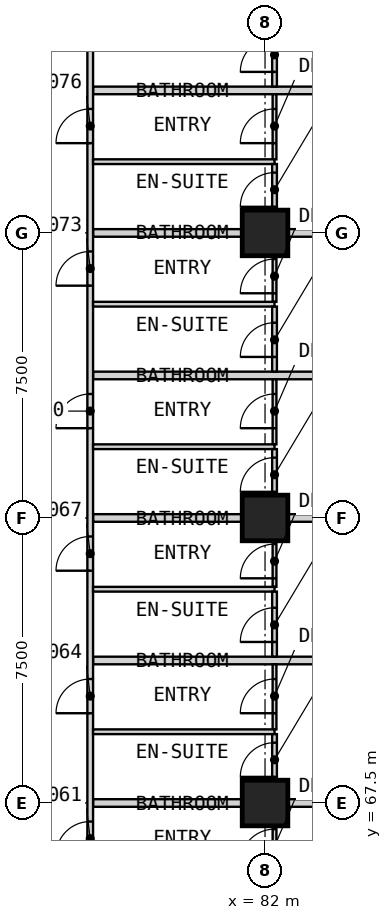
"""IFC4 building model, lengths in metres.
Left out: names, types, materials, properties, quantities, classifications, styles, units other than length and angle.
Written with IfcOpenShell. Run it as: python <this file> out.ifc"""

import sys

from ifc_helpers import new_model, si_unit, direction, frame, frame_2d, origin, origin_2d, place, context, subcontext, project, spatial, rectangle, extrude, element, fill, save


model = new_model("IFC4")
c1 = context("Model", 3, precision=1e-05, world=origin(), true_north=direction((0.0, 1.0)))
c2 = subcontext(c1, "Body", "Model", "MODEL_VIEW")
j1 = project(units=[si_unit("LENGTHUNIT", "METRE"), si_unit("PLANEANGLEUNIT", "RADIAN")], contexts=[c1])
p1 = place(None, origin())
s1 = spatial("IfcSite", under=j1, at=p1, CompositionType="ELEMENT")
p2 = place(p1, origin())
s2 = spatial("IfcBuilding", under=s1, at=p2, CompositionType="ELEMENT")
p3 = place(p2, frame((0.0, 0.0, 48.4)))
s3 = spatial("IfcBuildingStorey", under=s2, at=p3, CompositionType="ELEMENT", Elevation=48.4)
for number, where, z_axis, x_axis in (
    (1, (82.0, 67.5, 0.0), (0.0, 0.0, 1.0), (1.0, 0.0, 0.0)),
    (2, (82.0, 75.0, 0.0), (0.0, 0.0, 1.0), (1.0, 0.0, 0.0)),
    (3, (82.0, 82.5, 0.0), (0.0, 0.0, 1.0), (1.0, 0.0, 0.0)),
):
    element("IfcColumn", number, at=place(p3, frame(where, z_axis=z_axis, x_axis=x_axis)), inside=s3, PredefinedType="COLUMN", context=c2, shape_type="SweptSolid", body=[
        extrude(rectangle(XDim=1.2, YDim=1.2, at=origin_2d()), origin(), (0.0, 0.0, 1.0), 3.6),
    ])
p4 = place(p3, frame((77.475, 67.5, 0.0), z_axis=(0.0, 0.0, 1.0), x_axis=(1.0, 0.0, 0.0)))
e4 = element("IfcWall", 4, at=p4, inside=s3, PredefinedType="PARTITIONING", context=c2, shape_type="SweptSolid", body=[
    extrude(rectangle(XDim=12.525, YDim=0.2, at=frame_2d((6.262, 0.0))), origin(), (0.0, 0.0, 1.0), 3.35),
])
p5 = place(p3, frame((77.475, 71.25, 0.0), z_axis=(0.0, 0.0, 1.0), x_axis=(1.0, 0.0, 0.0)))
e5 = element("IfcWall", 5, at=p5, inside=s3, PredefinedType="PARTITIONING", context=c2, shape_type="SweptSolid", body=[
    extrude(rectangle(XDim=11.715, YDim=0.2, at=frame_2d((5.857, 0.0))), origin(), (0.0, 0.0, 1.0), 3.35),
])
p6 = place(p3, frame((77.475, 75.0, 0.0), z_axis=(0.0, 0.0, 1.0), x_axis=(1.0, 0.0, 0.0)))
e6 = element("IfcWall", 6, at=p6, inside=s3, PredefinedType="PARTITIONING", context=c2, shape_type="SweptSolid", body=[
    extrude(rectangle(XDim=12.525, YDim=0.2, at=frame_2d((6.262, 0.0))), origin(), (0.0, 0.0, 1.0), 3.35),
])
p7 = place(p3, frame((77.475, 78.75, 0.0), z_axis=(0.0, 0.0, 1.0), x_axis=(1.0, 0.0, 0.0)))
e7 = element("IfcWall", 7, at=p7, inside=s3, PredefinedType="PARTITIONING", context=c2, shape_type="SweptSolid", body=[
    extrude(rectangle(XDim=11.715, YDim=0.2, at=frame_2d((5.857, 0.0))), origin(), (0.0, 0.0, 1.0), 3.35),
])
p8 = place(p3, frame((77.475, 82.5, 0.0), z_axis=(0.0, 0.0, 1.0), x_axis=(1.0, 0.0, 0.0)))
e8 = element("IfcWall", 8, at=p8, inside=s3, PredefinedType="PARTITIONING", context=c2, shape_type="SweptSolid", body=[
    extrude(rectangle(XDim=12.525, YDim=0.2, at=frame_2d((6.262, 0.0))), origin(), (0.0, 0.0, 1.0), 3.35),
])
p9 = place(p3, frame((77.475, 86.25, 0.0), z_axis=(0.0, 0.0, 1.0), x_axis=(1.0, 0.0, 0.0)))
e9 = element("IfcWall", 9, at=p9, inside=s3, PredefinedType="PARTITIONING", context=c2, shape_type="SweptSolid", body=[
    extrude(rectangle(XDim=11.715, YDim=0.2, at=frame_2d((5.857, 0.0))), origin(), (0.0, 0.0, 1.0), 3.35),
])
p10 = place(p3, frame((77.4, 50.175, 0.0), z_axis=(0.0, 0.0, 1.0), x_axis=(0.0, 1.0, 0.0)))
e10 = element("IfcWall", 10, at=p10, inside=s3, PredefinedType="PARTITIONING", context=c2, shape_type="SweptSolid", body=[
    extrude(rectangle(XDim=42.15, YDim=0.15, at=frame_2d((21.075, 0.0))), origin(), (0.0, 0.0, 1.0), 3.35),
])
p11 = place(p10, frame((4.688, 0.0, 0.0)))
e11 = element("IfcOpeningElement", 11, at=p11, cuts=e10, PredefinedType="OPENING", context=c2, shape_type="SweptSolid", body=[
    extrude(rectangle(XDim=0.9, YDim=2.1, at=frame_2d((0.45, 1.05))), frame((0.0, 0.085, 0.0), z_axis=(0.0, -1.0, 0.0), x_axis=(1.0, 0.0, 0.0)), (0.0, 0.0, 1.0), 0.17),
])
p12 = place(p10, frame((8.438, 0.0, 0.0)))
e12 = element("IfcOpeningElement", 12, at=p12, cuts=e10, PredefinedType="OPENING", context=c2, shape_type="SweptSolid", body=[
    extrude(rectangle(XDim=0.9, YDim=2.1, at=frame_2d((0.45, 1.05))), frame((0.0, 0.085, 0.0), z_axis=(0.0, -1.0, 0.0), x_axis=(1.0, 0.0, 0.0)), (0.0, 0.0, 1.0), 0.17),
])
p13 = place(p10, frame((12.188, 0.0, 0.0)))
e13 = element("IfcOpeningElement", 13, at=p13, cuts=e10, PredefinedType="OPENING", context=c2, shape_type="SweptSolid", body=[
    extrude(rectangle(XDim=0.9, YDim=2.1, at=frame_2d((0.45, 1.05))), frame((0.0, 0.085, 0.0), z_axis=(0.0, -1.0, 0.0), x_axis=(1.0, 0.0, 0.0)), (0.0, 0.0, 1.0), 0.17),
])
p14 = place(p10, frame((15.938, 0.0, 0.0)))
e14 = element("IfcOpeningElement", 14, at=p14, cuts=e10, PredefinedType="OPENING", context=c2, shape_type="SweptSolid", body=[
    extrude(rectangle(XDim=0.9, YDim=2.1, at=frame_2d((0.45, 1.05))), frame((0.0, 0.085, 0.0), z_axis=(0.0, -1.0, 0.0), x_axis=(1.0, 0.0, 0.0)), (0.0, 0.0, 1.0), 0.17),
])
p15 = place(p10, frame((19.688, 0.0, 0.0)))
e15 = element("IfcOpeningElement", 15, at=p15, cuts=e10, PredefinedType="OPENING", context=c2, shape_type="SweptSolid", body=[
    extrude(rectangle(XDim=0.9, YDim=2.1, at=frame_2d((0.45, 1.05))), frame((0.0, 0.085, 0.0), z_axis=(0.0, -1.0, 0.0), x_axis=(1.0, 0.0, 0.0)), (0.0, 0.0, 1.0), 0.17),
])
p16 = place(p10, frame((23.438, 0.0, 0.0)))
e16 = element("IfcOpeningElement", 16, at=p16, cuts=e10, PredefinedType="OPENING", context=c2, shape_type="SweptSolid", body=[
    extrude(rectangle(XDim=0.9, YDim=2.1, at=frame_2d((0.45, 1.05))), frame((0.0, 0.085, 0.0), z_axis=(0.0, -1.0, 0.0), x_axis=(1.0, 0.0, 0.0)), (0.0, 0.0, 1.0), 0.17),
])
p17 = place(p10, frame((27.188, 0.0, 0.0)))
e17 = element("IfcOpeningElement", 17, at=p17, cuts=e10, PredefinedType="OPENING", context=c2, shape_type="SweptSolid", body=[
    extrude(rectangle(XDim=0.9, YDim=2.1, at=frame_2d((0.45, 1.05))), frame((0.0, 0.085, 0.0), z_axis=(0.0, -1.0, 0.0), x_axis=(1.0, 0.0, 0.0)), (0.0, 0.0, 1.0), 0.17),
])
p18 = place(p10, frame((30.938, 0.0, 0.0)))
e18 = element("IfcOpeningElement", 18, at=p18, cuts=e10, PredefinedType="OPENING", context=c2, shape_type="SweptSolid", body=[
    extrude(rectangle(XDim=0.9, YDim=2.1, at=frame_2d((0.45, 1.05))), frame((0.0, 0.085, 0.0), z_axis=(0.0, -1.0, 0.0), x_axis=(1.0, 0.0, 0.0)), (0.0, 0.0, 1.0), 0.17),
])
p19 = place(p10, frame((34.688, 0.0, 0.0)))
e19 = element("IfcOpeningElement", 19, at=p19, cuts=e10, PredefinedType="OPENING", context=c2, shape_type="SweptSolid", body=[
    extrude(rectangle(XDim=0.9, YDim=2.1, at=frame_2d((0.45, 1.05))), frame((0.0, 0.085, 0.0), z_axis=(0.0, -1.0, 0.0), x_axis=(1.0, 0.0, 0.0)), (0.0, 0.0, 1.0), 0.17),
])
p20 = place(p10, frame((38.438, 0.0, 0.0)))
e20 = element("IfcOpeningElement", 20, at=p20, cuts=e10, PredefinedType="OPENING", context=c2, shape_type="SweptSolid", body=[
    extrude(rectangle(XDim=0.9, YDim=2.1, at=frame_2d((0.45, 1.05))), frame((0.0, 0.085, 0.0), z_axis=(0.0, -1.0, 0.0), x_axis=(1.0, 0.0, 0.0)), (0.0, 0.0, 1.0), 0.17),
])
p21 = place(p3, frame((82.25, 65.688, 0.0), z_axis=(0.0, 0.0, 1.0), x_axis=(0.0, 1.0, 0.0)))
e21 = element("IfcWall", 21, at=p21, inside=s3, PredefinedType="PARTITIONING", context=c2, shape_type="SweptSolid", body=[
    extrude(rectangle(XDim=1.712, YDim=0.1, at=frame_2d((0.856, 0.0))), origin(), (0.0, 0.0, 1.0), 3.35),
])
p22 = place(p21, frame((0.225, 0.0, 0.0)))
e22 = element("IfcOpeningElement", 22, at=p22, cuts=e21, PredefinedType="OPENING", context=c2, shape_type="SweptSolid", body=[
    extrude(rectangle(XDim=0.9, YDim=2.1, at=frame_2d((0.45, 1.05))), frame((0.0, 0.06, 0.0), z_axis=(0.0, -1.0, 0.0), x_axis=(1.0, 0.0, 0.0)), (0.0, 0.0, 1.0), 0.12),
])
p23 = place(p3, frame((82.25, 69.438, 0.0), z_axis=(0.0, 0.0, 1.0), x_axis=(0.0, 1.0, 0.0)))
e23 = element("IfcWall", 23, at=p23, inside=s3, PredefinedType="PARTITIONING", context=c2, shape_type="SweptSolid", body=[
    extrude(rectangle(XDim=1.712, YDim=0.1, at=frame_2d((0.856, 0.0))), origin(), (0.0, 0.0, 1.0), 3.35),
])
p24 = place(p23, frame((0.425, 0.0, 0.0)))
e24 = element("IfcOpeningElement", 24, at=p24, cuts=e23, PredefinedType="OPENING", context=c2, shape_type="SweptSolid", body=[
    extrude(rectangle(XDim=0.9, YDim=2.1, at=frame_2d((0.45, 1.05))), frame((0.0, 0.06, 0.0), z_axis=(0.0, -1.0, 0.0), x_axis=(1.0, 0.0, 0.0)), (0.0, 0.0, 1.0), 0.12),
])
p25 = place(p3, frame((82.25, 73.188, 0.0), z_axis=(0.0, 0.0, 1.0), x_axis=(0.0, 1.0, 0.0)))
e25 = element("IfcWall", 25, at=p25, inside=s3, PredefinedType="PARTITIONING", context=c2, shape_type="SweptSolid", body=[
    extrude(rectangle(XDim=1.712, YDim=0.1, at=frame_2d((0.856, 0.0))), origin(), (0.0, 0.0, 1.0), 3.35),
])
p26 = place(p25, frame((0.225, 0.0, 0.0)))
e26 = element("IfcOpeningElement", 26, at=p26, cuts=e25, PredefinedType="OPENING", context=c2, shape_type="SweptSolid", body=[
    extrude(rectangle(XDim=0.9, YDim=2.1, at=frame_2d((0.45, 1.05))), frame((0.0, 0.06, 0.0), z_axis=(0.0, -1.0, 0.0), x_axis=(1.0, 0.0, 0.0)), (0.0, 0.0, 1.0), 0.12),
])
p27 = place(p3, frame((82.25, 76.938, 0.0), z_axis=(0.0, 0.0, 1.0), x_axis=(0.0, 1.0, 0.0)))
e27 = element("IfcWall", 27, at=p27, inside=s3, PredefinedType="PARTITIONING", context=c2, shape_type="SweptSolid", body=[
    extrude(rectangle(XDim=1.712, YDim=0.1, at=frame_2d((0.856, 0.0))), origin(), (0.0, 0.0, 1.0), 3.35),
])
p28 = place(p27, frame((0.425, 0.0, 0.0)))
e28 = element("IfcOpeningElement", 28, at=p28, cuts=e27, PredefinedType="OPENING", context=c2, shape_type="SweptSolid", body=[
    extrude(rectangle(XDim=0.9, YDim=2.1, at=frame_2d((0.45, 1.05))), frame((0.0, 0.06, 0.0), z_axis=(0.0, -1.0, 0.0), x_axis=(1.0, 0.0, 0.0)), (0.0, 0.0, 1.0), 0.12),
])
p29 = place(p3, frame((82.25, 80.688, 0.0), z_axis=(0.0, 0.0, 1.0), x_axis=(0.0, 1.0, 0.0)))
e29 = element("IfcWall", 29, at=p29, inside=s3, PredefinedType="PARTITIONING", context=c2, shape_type="SweptSolid", body=[
    extrude(rectangle(XDim=1.712, YDim=0.1, at=frame_2d((0.856, 0.0))), origin(), (0.0, 0.0, 1.0), 3.35),
])
p30 = place(p29, frame((0.225, 0.0, 0.0)))
e30 = element("IfcOpeningElement", 30, at=p30, cuts=e29, PredefinedType="OPENING", context=c2, shape_type="SweptSolid", body=[
    extrude(rectangle(XDim=0.9, YDim=2.1, at=frame_2d((0.45, 1.05))), frame((0.0, 0.06, 0.0), z_axis=(0.0, -1.0, 0.0), x_axis=(1.0, 0.0, 0.0)), (0.0, 0.0, 1.0), 0.12),
])
p31 = place(p3, frame((82.25, 84.438, 0.0), z_axis=(0.0, 0.0, 1.0), x_axis=(0.0, 1.0, 0.0)))
e31 = element("IfcWall", 31, at=p31, inside=s3, PredefinedType="PARTITIONING", context=c2, shape_type="SweptSolid", body=[
    extrude(rectangle(XDim=1.712, YDim=0.1, at=frame_2d((0.856, 0.0))), origin(), (0.0, 0.0, 1.0), 3.35),
])
p32 = place(p31, frame((0.425, 0.0, 0.0)))
e32 = element("IfcOpeningElement", 32, at=p32, cuts=e31, PredefinedType="OPENING", context=c2, shape_type="SweptSolid", body=[
    extrude(rectangle(XDim=0.9, YDim=2.1, at=frame_2d((0.45, 1.05))), frame((0.0, 0.06, 0.0), z_axis=(0.0, -1.0, 0.0), x_axis=(1.0, 0.0, 0.0)), (0.0, 0.0, 1.0), 0.12),
])
for number, where, z_axis, x_axis in (
    (33, (77.475, 69.375, 0.0), (0.0, 0.0, 1.0), (1.0, 0.0, 0.0)),
    (34, (77.475, 73.125, 0.0), (0.0, 0.0, 1.0), (1.0, 0.0, 0.0)),
    (35, (77.475, 76.875, 0.0), (0.0, 0.0, 1.0), (1.0, 0.0, 0.0)),
    (36, (77.475, 80.625, 0.0), (0.0, 0.0, 1.0), (1.0, 0.0, 0.0)),
    (37, (77.475, 84.375, 0.0), (0.0, 0.0, 1.0), (1.0, 0.0, 0.0)),
):
    element("IfcWall", number, at=place(p3, frame(where, z_axis=z_axis, x_axis=x_axis)), inside=s3, PredefinedType="PARTITIONING", context=c2, shape_type="SweptSolid", body=[
        extrude(rectangle(XDim=4.775, YDim=0.125, at=frame_2d((2.387, 0.0))), origin(), (0.0, 0.0, 1.0), 3.35),
    ])
p33 = place(p3, frame((82.25, 67.6, 0.0), z_axis=(0.0, 0.0, 1.0), x_axis=(0.0, 1.0, 0.0)))
e38 = element("IfcWall", 38, at=p33, inside=s3, PredefinedType="PARTITIONING", context=c2, shape_type="SweptSolid", body=[
    extrude(rectangle(XDim=1.712, YDim=0.125, at=frame_2d((0.856, 0.0))), origin(), (0.0, 0.0, 1.0), 3.35),
])
p34 = place(p33, frame((0.587, 0.0, 0.0)))
e39 = element("IfcOpeningElement", 39, at=p34, cuts=e38, PredefinedType="OPENING", context=c2, shape_type="SweptSolid", body=[
    extrude(rectangle(XDim=0.9, YDim=2.1, at=frame_2d((0.45, 1.05))), frame((0.0, 0.073, 0.0), z_axis=(0.0, -1.0, 0.0), x_axis=(1.0, 0.0, 0.0)), (0.0, 0.0, 1.0), 0.145),
])
p35 = place(p3, frame((82.25, 71.35, 0.0), z_axis=(0.0, 0.0, 1.0), x_axis=(0.0, 1.0, 0.0)))
e40 = element("IfcWall", 40, at=p35, inside=s3, PredefinedType="PARTITIONING", context=c2, shape_type="SweptSolid", body=[
    extrude(rectangle(XDim=1.712, YDim=0.125, at=frame_2d((0.856, 0.0))), origin(), (0.0, 0.0, 1.0), 3.35),
])
p36 = place(p35, frame((0.387, 0.0, 0.0)))
e41 = element("IfcOpeningElement", 41, at=p36, cuts=e40, PredefinedType="OPENING", context=c2, shape_type="SweptSolid", body=[
    extrude(rectangle(XDim=0.9, YDim=2.1, at=frame_2d((0.45, 1.05))), frame((0.0, 0.073, 0.0), z_axis=(0.0, -1.0, 0.0), x_axis=(1.0, 0.0, 0.0)), (0.0, 0.0, 1.0), 0.145),
])
p37 = place(p3, frame((82.25, 75.1, 0.0), z_axis=(0.0, 0.0, 1.0), x_axis=(0.0, 1.0, 0.0)))
e42 = element("IfcWall", 42, at=p37, inside=s3, PredefinedType="PARTITIONING", context=c2, shape_type="SweptSolid", body=[
    extrude(rectangle(XDim=1.712, YDim=0.125, at=frame_2d((0.856, 0.0))), origin(), (0.0, 0.0, 1.0), 3.35),
])
p38 = place(p37, frame((0.587, 0.0, 0.0)))
e43 = element("IfcOpeningElement", 43, at=p38, cuts=e42, PredefinedType="OPENING", context=c2, shape_type="SweptSolid", body=[
    extrude(rectangle(XDim=0.9, YDim=2.1, at=frame_2d((0.45, 1.05))), frame((0.0, 0.073, 0.0), z_axis=(0.0, -1.0, 0.0), x_axis=(1.0, 0.0, 0.0)), (0.0, 0.0, 1.0), 0.145),
])
p39 = place(p3, frame((82.25, 78.85, 0.0), z_axis=(0.0, 0.0, 1.0), x_axis=(0.0, 1.0, 0.0)))
e44 = element("IfcWall", 44, at=p39, inside=s3, PredefinedType="PARTITIONING", context=c2, shape_type="SweptSolid", body=[
    extrude(rectangle(XDim=1.712, YDim=0.125, at=frame_2d((0.856, 0.0))), origin(), (0.0, 0.0, 1.0), 3.35),
])
p40 = place(p39, frame((0.387, 0.0, 0.0)))
e45 = element("IfcOpeningElement", 45, at=p40, cuts=e44, PredefinedType="OPENING", context=c2, shape_type="SweptSolid", body=[
    extrude(rectangle(XDim=0.9, YDim=2.1, at=frame_2d((0.45, 1.05))), frame((0.0, 0.073, 0.0), z_axis=(0.0, -1.0, 0.0), x_axis=(1.0, 0.0, 0.0)), (0.0, 0.0, 1.0), 0.145),
])
p41 = place(p3, frame((82.25, 82.6, 0.0), z_axis=(0.0, 0.0, 1.0), x_axis=(0.0, 1.0, 0.0)))
e46 = element("IfcWall", 46, at=p41, inside=s3, PredefinedType="PARTITIONING", context=c2, shape_type="SweptSolid", body=[
    extrude(rectangle(XDim=1.712, YDim=0.125, at=frame_2d((0.856, 0.0))), origin(), (0.0, 0.0, 1.0), 3.35),
])
p42 = place(p41, frame((0.587, 0.0, 0.0)))
e47 = element("IfcOpeningElement", 47, at=p42, cuts=e46, PredefinedType="OPENING", context=c2, shape_type="SweptSolid", body=[
    extrude(rectangle(XDim=0.9, YDim=2.1, at=frame_2d((0.45, 1.05))), frame((0.0, 0.073, 0.0), z_axis=(0.0, -1.0, 0.0), x_axis=(1.0, 0.0, 0.0)), (0.0, 0.0, 1.0), 0.145),
])
p43 = place(p3, frame((82.25, 86.35, 0.0), z_axis=(0.0, 0.0, 1.0), x_axis=(0.0, 1.0, 0.0)))
e48 = element("IfcWall", 48, at=p43, inside=s3, PredefinedType="PARTITIONING", context=c2, shape_type="SweptSolid", body=[
    extrude(rectangle(XDim=1.712, YDim=0.125, at=frame_2d((0.856, 0.0))), origin(), (0.0, 0.0, 1.0), 3.35),
])
p44 = place(p43, frame((0.387, 0.0, 0.0)))
e49 = element("IfcOpeningElement", 49, at=p44, cuts=e48, PredefinedType="OPENING", context=c2, shape_type="SweptSolid", body=[
    extrude(rectangle(XDim=0.9, YDim=2.1, at=frame_2d((0.45, 1.05))), frame((0.0, 0.073, 0.0), z_axis=(0.0, -1.0, 0.0), x_axis=(1.0, 0.0, 0.0)), (0.0, 0.0, 1.0), 0.145),
])
p45 = place(p14, origin())
e50 = element("IfcDoor", 50, at=p45, inside=s3, OperationType="SINGLE_SWING_RIGHT", PredefinedType="DOOR", context=c2, shape_type="SweptSolid", body=[
    extrude(rectangle(XDim=0.9, YDim=2.1, at=frame_2d((0.45, 1.05))), frame((0.0, 0.025, 0.0), z_axis=(0.0, -1.0, 0.0), x_axis=(1.0, 0.0, 0.0)), (0.0, 0.0, 1.0), 0.05),
])
fill(e14, e50)
p46 = place(p22, origin())
e51 = element("IfcDoor", 51, at=p46, inside=s3, OperationType="SINGLE_SWING_LEFT", PredefinedType="DOOR", context=c2, shape_type="SweptSolid", body=[
    extrude(rectangle(XDim=0.9, YDim=2.1, at=frame_2d((0.45, 1.05))), frame((0.0, 0.025, 0.0), z_axis=(0.0, -1.0, 0.0), x_axis=(1.0, 0.0, 0.0)), (0.0, 0.0, 1.0), 0.05),
])
fill(e22, e51)
p47 = place(p34, origin())
e52 = element("IfcDoor", 52, at=p47, inside=s3, OperationType="SINGLE_SWING_RIGHT", PredefinedType="DOOR", context=c2, shape_type="SweptSolid", body=[
    extrude(rectangle(XDim=0.9, YDim=2.1, at=frame_2d((0.45, 1.05))), frame((0.0, 0.025, 0.0), z_axis=(0.0, -1.0, 0.0), x_axis=(1.0, 0.0, 0.0)), (0.0, 0.0, 1.0), 0.05),
])
fill(e39, e52)
p48 = place(p15, origin())
e53 = element("IfcDoor", 53, at=p48, inside=s3, OperationType="SINGLE_SWING_RIGHT", PredefinedType="DOOR", context=c2, shape_type="SweptSolid", body=[
    extrude(rectangle(XDim=0.9, YDim=2.1, at=frame_2d((0.45, 1.05))), frame((0.0, 0.025, 0.0), z_axis=(0.0, -1.0, 0.0), x_axis=(1.0, 0.0, 0.0)), (0.0, 0.0, 1.0), 0.05),
])
fill(e15, e53)
p49 = place(p24, origin())
e54 = element("IfcDoor", 54, at=p49, inside=s3, OperationType="SINGLE_SWING_LEFT", PredefinedType="DOOR", context=c2, shape_type="SweptSolid", body=[
    extrude(rectangle(XDim=0.9, YDim=2.1, at=frame_2d((0.45, 1.05))), frame((0.0, 0.025, 0.0), z_axis=(0.0, -1.0, 0.0), x_axis=(1.0, 0.0, 0.0)), (0.0, 0.0, 1.0), 0.05),
])
fill(e24, e54)
p50 = place(p36, origin())
e55 = element("IfcDoor", 55, at=p50, inside=s3, OperationType="SINGLE_SWING_LEFT", PredefinedType="DOOR", context=c2, shape_type="SweptSolid", body=[
    extrude(rectangle(XDim=0.9, YDim=2.1, at=frame_2d((0.45, 1.05))), frame((0.0, 0.025, 0.0), z_axis=(0.0, -1.0, 0.0), x_axis=(1.0, 0.0, 0.0)), (0.0, 0.0, 1.0), 0.05),
])
fill(e41, e55)
p51 = place(p16, origin())
e56 = element("IfcDoor", 56, at=p51, inside=s3, OperationType="SINGLE_SWING_RIGHT", PredefinedType="DOOR", context=c2, shape_type="SweptSolid", body=[
    extrude(rectangle(XDim=0.9, YDim=2.1, at=frame_2d((0.45, 1.05))), frame((0.0, 0.025, 0.0), z_axis=(0.0, -1.0, 0.0), x_axis=(1.0, 0.0, 0.0)), (0.0, 0.0, 1.0), 0.05),
])
fill(e16, e56)
p52 = place(p26, origin())
e57 = element("IfcDoor", 57, at=p52, inside=s3, OperationType="SINGLE_SWING_LEFT", PredefinedType="DOOR", context=c2, shape_type="SweptSolid", body=[
    extrude(rectangle(XDim=0.9, YDim=2.1, at=frame_2d((0.45, 1.05))), frame((0.0, 0.025, 0.0), z_axis=(0.0, -1.0, 0.0), x_axis=(1.0, 0.0, 0.0)), (0.0, 0.0, 1.0), 0.05),
])
fill(e26, e57)
p53 = place(p38, origin())
e58 = element("IfcDoor", 58, at=p53, inside=s3, OperationType="SINGLE_SWING_RIGHT", PredefinedType="DOOR", context=c2, shape_type="SweptSolid", body=[
    extrude(rectangle(XDim=0.9, YDim=2.1, at=frame_2d((0.45, 1.05))), frame((0.0, 0.025, 0.0), z_axis=(0.0, -1.0, 0.0), x_axis=(1.0, 0.0, 0.0)), (0.0, 0.0, 1.0), 0.05),
])
fill(e43, e58)
p54 = place(p17, origin())
e59 = element("IfcDoor", 59, at=p54, inside=s3, OperationType="SINGLE_SWING_RIGHT", PredefinedType="DOOR", context=c2, shape_type="SweptSolid", body=[
    extrude(rectangle(XDim=0.9, YDim=2.1, at=frame_2d((0.45, 1.05))), frame((0.0, 0.025, 0.0), z_axis=(0.0, -1.0, 0.0), x_axis=(1.0, 0.0, 0.0)), (0.0, 0.0, 1.0), 0.05),
])
fill(e17, e59)
p55 = place(p28, origin())
e60 = element("IfcDoor", 60, at=p55, inside=s3, OperationType="SINGLE_SWING_LEFT", PredefinedType="DOOR", context=c2, shape_type="SweptSolid", body=[
    extrude(rectangle(XDim=0.9, YDim=2.1, at=frame_2d((0.45, 1.05))), frame((0.0, 0.025, 0.0), z_axis=(0.0, -1.0, 0.0), x_axis=(1.0, 0.0, 0.0)), (0.0, 0.0, 1.0), 0.05),
])
fill(e28, e60)
p56 = place(p40, origin())
e61 = element("IfcDoor", 61, at=p56, inside=s3, OperationType="SINGLE_SWING_LEFT", PredefinedType="DOOR", context=c2, shape_type="SweptSolid", body=[
    extrude(rectangle(XDim=0.9, YDim=2.1, at=frame_2d((0.45, 1.05))), frame((0.0, 0.025, 0.0), z_axis=(0.0, -1.0, 0.0), x_axis=(1.0, 0.0, 0.0)), (0.0, 0.0, 1.0), 0.05),
])
fill(e45, e61)
p57 = place(p18, origin())
e62 = element("IfcDoor", 62, at=p57, inside=s3, OperationType="SINGLE_SWING_RIGHT", PredefinedType="DOOR", context=c2, shape_type="SweptSolid", body=[
    extrude(rectangle(XDim=0.9, YDim=2.1, at=frame_2d((0.45, 1.05))), frame((0.0, 0.025, 0.0), z_axis=(0.0, -1.0, 0.0), x_axis=(1.0, 0.0, 0.0)), (0.0, 0.0, 1.0), 0.05),
])
fill(e18, e62)
p58 = place(p30, origin())
e63 = element("IfcDoor", 63, at=p58, inside=s3, OperationType="SINGLE_SWING_LEFT", PredefinedType="DOOR", context=c2, shape_type="SweptSolid", body=[
    extrude(rectangle(XDim=0.9, YDim=2.1, at=frame_2d((0.45, 1.05))), frame((0.0, 0.025, 0.0), z_axis=(0.0, -1.0, 0.0), x_axis=(1.0, 0.0, 0.0)), (0.0, 0.0, 1.0), 0.05),
])
fill(e30, e63)
p59 = place(p42, origin())
e64 = element("IfcDoor", 64, at=p59, inside=s3, OperationType="SINGLE_SWING_RIGHT", PredefinedType="DOOR", context=c2, shape_type="SweptSolid", body=[
    extrude(rectangle(XDim=0.9, YDim=2.1, at=frame_2d((0.45, 1.05))), frame((0.0, 0.025, 0.0), z_axis=(0.0, -1.0, 0.0), x_axis=(1.0, 0.0, 0.0)), (0.0, 0.0, 1.0), 0.05),
])
fill(e47, e64)
p60 = place(p19, origin())
e65 = element("IfcDoor", 65, at=p60, inside=s3, OperationType="SINGLE_SWING_RIGHT", PredefinedType="DOOR", context=c2, shape_type="SweptSolid", body=[
    extrude(rectangle(XDim=0.9, YDim=2.1, at=frame_2d((0.45, 1.05))), frame((0.0, 0.025, 0.0), z_axis=(0.0, -1.0, 0.0), x_axis=(1.0, 0.0, 0.0)), (0.0, 0.0, 1.0), 0.05),
])
fill(e19, e65)
p61 = place(p32, origin())
e66 = element("IfcDoor", 66, at=p61, inside=s3, OperationType="SINGLE_SWING_LEFT", PredefinedType="DOOR", context=c2, shape_type="SweptSolid", body=[
    extrude(rectangle(XDim=0.9, YDim=2.1, at=frame_2d((0.45, 1.05))), frame((0.0, 0.025, 0.0), z_axis=(0.0, -1.0, 0.0), x_axis=(1.0, 0.0, 0.0)), (0.0, 0.0, 1.0), 0.05),
])
fill(e32, e66)
p62 = place(p44, origin())
e67 = element("IfcDoor", 67, at=p62, inside=s3, OperationType="SINGLE_SWING_LEFT", PredefinedType="DOOR", context=c2, shape_type="SweptSolid", body=[
    extrude(rectangle(XDim=0.9, YDim=2.1, at=frame_2d((0.45, 1.05))), frame((0.0, 0.025, 0.0), z_axis=(0.0, -1.0, 0.0), x_axis=(1.0, 0.0, 0.0)), (0.0, 0.0, 1.0), 0.05),
])
fill(e49, e67)
save(model, sys.argv[1])
